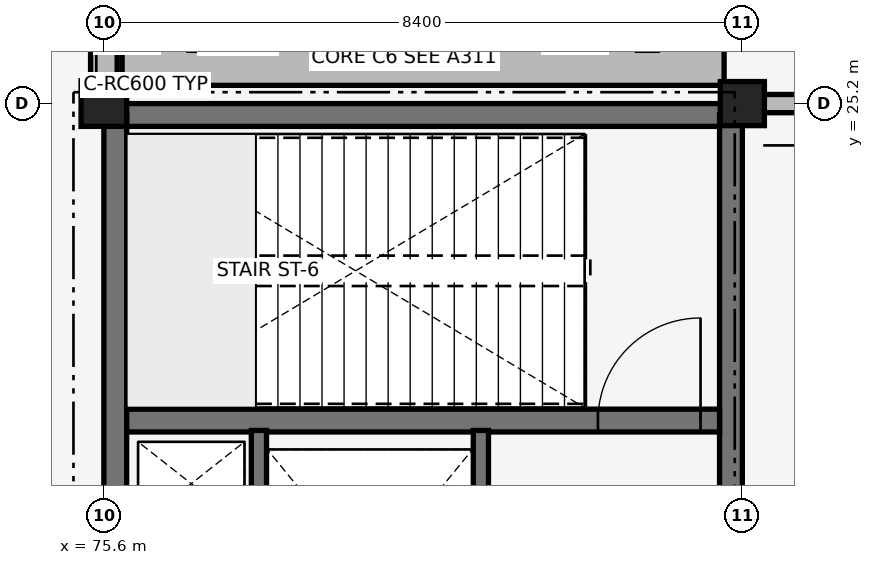
"""IFC4 building model, lengths in metres.
Left out: names, types, materials, properties, quantities, classifications, styles, units other than length and angle.
Written with IfcOpenShell. Run it as: python <this file> out.ifc"""

import sys

from ifc_helpers import new_model, si_unit, direction, frame, frame_2d, origin, origin_2d, place, context, subcontext, project, spatial, polyline, rectangle, outline, extrude, element, fill, save


model = new_model("IFC4")
c1 = context("Model", 3, precision=1e-05, world=origin(), true_north=direction((0.0, 1.0)))
c2 = subcontext(c1, "Body", "Model", "MODEL_VIEW")
j1 = project(units=[si_unit("LENGTHUNIT", "METRE"), si_unit("PLANEANGLEUNIT", "RADIAN")], contexts=[c1])
p1 = place(None, origin())
s1 = spatial("IfcSite", under=j1, at=p1, CompositionType="ELEMENT")
p2 = place(p1, origin())
s2 = spatial("IfcBuilding", under=s1, at=p2, CompositionType="ELEMENT")
p3 = place(p2, origin())
s3 = spatial("IfcBuildingStorey", under=s2, at=p3, CompositionType="ELEMENT", Elevation=0.0)
for number, where, z_axis, x_axis in (
    (1, (75.75, 25.05, 0.0), (0.0, 0.0, 1.0), (1.0, 0.0, 0.0)),
    (2, (75.75, 16.95, 0.0), (0.0, 0.0, 1.0), (0.0, 1.0, 0.0)),
):
    element("IfcWall", number, at=place(p3, frame(where, z_axis=z_axis, x_axis=x_axis)), inside=s3, PredefinedType="SHEAR", context=c2, shape_type="SweptSolid", body=[
        extrude(rectangle(XDim=8.1, YDim=0.3, at=frame_2d((4.05, 0.0))), origin(), (0.0, 0.0, 1.0), 5.14),
    ])
p4 = place(p3, frame((83.85, 16.95, 0.0), z_axis=(0.0, 0.0, 1.0), x_axis=(0.0, 1.0, 0.0)))
e3 = element("IfcWall", 3, at=p4, inside=s3, PredefinedType="SHEAR", context=c2, shape_type="SweptSolid", body=[
    extrude(rectangle(XDim=8.1, YDim=0.3, at=frame_2d((4.05, 0.0))), origin(), (0.0, 0.0, 1.0), 5.14),
])
p5 = place(p4, frame((1.325, 0.0, 0.0)))
e4 = element("IfcOpeningElement", 4, at=p5, cuts=e3, PredefinedType="OPENING", context=c2, shape_type="SweptSolid", body=[
    extrude(rectangle(XDim=1.45, YDim=2.15, at=frame_2d((0.725, 1.075))), frame((0.0, 0.16, 0.0), z_axis=(0.0, -1.0, 0.0), x_axis=(1.0, 0.0, 0.0)), (0.0, 0.0, 1.0), 0.32),
])
p6 = place(p3, frame((75.9, 21.03, 0.0), z_axis=(0.0, 0.0, 1.0), x_axis=(1.0, 0.0, 0.0)))
e5 = element("IfcWall", 5, at=p6, inside=s3, PredefinedType="SHEAR", context=c2, shape_type="SweptSolid", body=[
    extrude(rectangle(XDim=7.8, YDim=0.3, at=frame_2d((3.9, 0.0))), origin(), (0.0, 0.0, 1.0), 5.14),
])
p7 = place(p6, frame((6.2, 0.0, 0.0)))
e6 = element("IfcOpeningElement", 6, at=p7, cuts=e5, PredefinedType="OPENING", context=c2, shape_type="SweptSolid", body=[
    extrude(rectangle(XDim=1.35, YDim=2.15, at=frame_2d((0.675, 1.075))), frame((0.0, 0.16, 0.0), z_axis=(0.0, -1.0, 0.0), x_axis=(1.0, 0.0, 0.0)), (0.0, 0.0, 1.0), 0.32),
])
p8 = place(p3, frame((75.6, 25.2, 0.0), z_axis=(0.0, 0.0, 1.0), x_axis=(1.0, 0.0, 0.0)))
e7 = element("IfcColumn", 7, at=p8, inside=s3, PredefinedType="COLUMN", context=c2, shape_type="SweptSolid", body=[
    extrude(rectangle(XDim=0.6, YDim=0.6, at=origin_2d()), origin(), (0.0, 0.0, 1.0), 5.14),
])
p9 = place(p3, frame((84.0, 25.2, 0.0), z_axis=(0.0, 0.0, 1.0), x_axis=(1.0, 0.0, 0.0)))
e8 = element("IfcColumn", 8, at=p9, inside=s3, PredefinedType="COLUMN", context=c2, shape_type="SweptSolid", body=[
    extrude(rectangle(XDim=0.58, YDim=0.58, at=origin_2d()), origin(), (0.0, 0.0, 1.0), 5.14),
])
p10 = place(p3, frame((75.6, 25.2, 5.145), z_axis=(0.0, 0.0, 1.0), x_axis=(0.0, 1.0, 0.0)))
e9 = element("IfcWall", 9, at=p10, inside=s3, PredefinedType="SOLIDWALL", context=c2, shape_type="SweptSolid", body=[
    extrude(outline(polyline([(0.0, 0.0), (8.4, 0.0), (8.4, 0.25), (4.2, 2.489), (0.0, 0.25), (0.0, 0.0)])), frame((0.0, 0.175, 0.0), z_axis=(0.0, -1.0, 0.0), x_axis=(1.0, 0.0, 0.0)), (0.0, 0.0, 1.0), 0.35),
])
p11 = place(p3, frame((75.84, 25.68, -0.25), z_axis=(0.0, 0.0, 1.0), x_axis=(1.0, 0.0, 0.0)))
e10 = element("IfcWall", 10, at=p11, inside=s3, PredefinedType="SOLIDWALL", context=c2, shape_type="SweptSolid", body=[
    extrude(rectangle(XDim=7.92, YDim=0.48, at=frame_2d((3.96, 0.0))), origin(), (0.0, 0.0, 1.0), 5.69),
])
p12 = place(p3, frame((84.275, 25.2, 0.0), z_axis=(0.0, 0.0, 1.0), x_axis=(1.0, 0.0, 0.0)))
e11 = element("IfcWall", 11, at=p12, inside=s3, PredefinedType="SOLIDWALL", context=c2, shape_type="SweptSolid", body=[
    extrude(rectangle(XDim=7.84, YDim=0.24, at=frame_2d((3.92, 0.0))), origin(), (0.0, 0.0, 1.0), 4.39),
])
p13 = place(p12, frame((0.804, 0.0, 0.35)))
e12 = element("IfcOpeningElement", 12, at=p13, cuts=e11, PredefinedType="OPENING", context=c2, shape_type="SweptSolid", body=[
    extrude(rectangle(XDim=0.44, YDim=1.25, at=frame_2d((0.22, 0.625))), frame((0.0, 0.13, 0.0), z_axis=(0.0, -1.0, 0.0), x_axis=(1.0, 0.0, 0.0)), (0.0, 0.0, 1.0), 0.26),
])
p14 = place(p12, frame((2.252, 0.0, 0.35)))
e13 = element("IfcOpeningElement", 13, at=p14, cuts=e11, PredefinedType="OPENING", context=c2, shape_type="SweptSolid", body=[
    extrude(rectangle(XDim=0.44, YDim=1.25, at=frame_2d((0.22, 0.625))), frame((0.0, 0.13, 0.0), z_axis=(0.0, -1.0, 0.0), x_axis=(1.0, 0.0, 0.0)), (0.0, 0.0, 1.0), 0.26),
])
p15 = place(p12, frame((3.7, 0.0, 0.35)))
e14 = element("IfcOpeningElement", 14, at=p15, cuts=e11, PredefinedType="OPENING", context=c2, shape_type="SweptSolid", body=[
    extrude(rectangle(XDim=0.44, YDim=1.25, at=frame_2d((0.22, 0.625))), frame((0.0, 0.13, 0.0), z_axis=(0.0, -1.0, 0.0), x_axis=(1.0, 0.0, 0.0)), (0.0, 0.0, 1.0), 0.26),
])
p16 = place(p12, frame((5.148, 0.0, 0.35)))
e15 = element("IfcOpeningElement", 15, at=p16, cuts=e11, PredefinedType="OPENING", context=c2, shape_type="SweptSolid", body=[
    extrude(rectangle(XDim=0.44, YDim=1.25, at=frame_2d((0.22, 0.625))), frame((0.0, 0.13, 0.0), z_axis=(0.0, -1.0, 0.0), x_axis=(1.0, 0.0, 0.0)), (0.0, 0.0, 1.0), 0.26),
])
p17 = place(p12, frame((6.596, 0.0, 0.35)))
e16 = element("IfcOpeningElement", 16, at=p17, cuts=e11, PredefinedType="OPENING", context=c2, shape_type="SweptSolid", body=[
    extrude(rectangle(XDim=0.44, YDim=1.25, at=frame_2d((0.22, 0.625))), frame((0.0, 0.13, 0.0), z_axis=(0.0, -1.0, 0.0), x_axis=(1.0, 0.0, 0.0)), (0.0, 0.0, 1.0), 0.26),
])
p18 = place(p12, frame((0.804, 0.0, 1.8)))
e17 = element("IfcOpeningElement", 17, at=p18, cuts=e11, PredefinedType="OPENING", context=c2, shape_type="SweptSolid", body=[
    extrude(rectangle(XDim=0.44, YDim=1.25, at=frame_2d((0.22, 0.625))), frame((0.0, 0.13, 0.0), z_axis=(0.0, -1.0, 0.0), x_axis=(1.0, 0.0, 0.0)), (0.0, 0.0, 1.0), 0.26),
])
p19 = place(p12, frame((2.252, 0.0, 1.8)))
e18 = element("IfcOpeningElement", 18, at=p19, cuts=e11, PredefinedType="OPENING", context=c2, shape_type="SweptSolid", body=[
    extrude(rectangle(XDim=0.44, YDim=1.25, at=frame_2d((0.22, 0.625))), frame((0.0, 0.13, 0.0), z_axis=(0.0, -1.0, 0.0), x_axis=(1.0, 0.0, 0.0)), (0.0, 0.0, 1.0), 0.26),
])
p20 = place(p12, frame((3.7, 0.0, 1.8)))
e19 = element("IfcOpeningElement", 19, at=p20, cuts=e11, PredefinedType="OPENING", context=c2, shape_type="SweptSolid", body=[
    extrude(rectangle(XDim=0.44, YDim=1.25, at=frame_2d((0.22, 0.625))), frame((0.0, 0.13, 0.0), z_axis=(0.0, -1.0, 0.0), x_axis=(1.0, 0.0, 0.0)), (0.0, 0.0, 1.0), 0.26),
])
p21 = place(p12, frame((5.148, 0.0, 1.8)))
e20 = element("IfcOpeningElement", 20, at=p21, cuts=e11, PredefinedType="OPENING", context=c2, shape_type="SweptSolid", body=[
    extrude(rectangle(XDim=0.44, YDim=1.25, at=frame_2d((0.22, 0.625))), frame((0.0, 0.13, 0.0), z_axis=(0.0, -1.0, 0.0), x_axis=(1.0, 0.0, 0.0)), (0.0, 0.0, 1.0), 0.26),
])
p22 = place(p12, frame((6.596, 0.0, 1.8)))
e21 = element("IfcOpeningElement", 21, at=p22, cuts=e11, PredefinedType="OPENING", context=c2, shape_type="SweptSolid", body=[
    extrude(rectangle(XDim=0.44, YDim=1.25, at=frame_2d((0.22, 0.625))), frame((0.0, 0.13, 0.0), z_axis=(0.0, -1.0, 0.0), x_axis=(1.0, 0.0, 0.0)), (0.0, 0.0, 1.0), 0.26),
])
p23 = place(p3, frame((80.56, 17.1, 0.0), z_axis=(0.0, 0.0, 1.0), x_axis=(0.0, 1.0, 0.0)))
e22 = element("IfcWall", 22, at=p23, inside=s3, PredefinedType="SHEAR", context=c2, shape_type="SweptSolid", body=[
    extrude(rectangle(XDim=3.8, YDim=0.2, at=frame_2d((1.9, 0.0))), origin(), (0.0, 0.0, 1.0), 4.36),
])
p24 = place(p23, frame((1.35, 0.0, 0.0)))
e23 = element("IfcOpeningElement", 23, at=p24, cuts=e22, PredefinedType="OPENING", context=c2, shape_type="SweptSolid", body=[
    extrude(rectangle(XDim=1.1, YDim=2.15, at=frame_2d((0.55, 1.075))), frame((0.0, 0.11, 0.0), z_axis=(0.0, -1.0, 0.0), x_axis=(1.0, 0.0, 0.0)), (0.0, 0.0, 1.0), 0.22),
])
p25 = place(p3, frame((77.64, 17.1, 0.0), z_axis=(0.0, 0.0, 1.0), x_axis=(0.0, 1.0, 0.0)))
e24 = element("IfcWall", 24, at=p25, inside=s3, PredefinedType="SHEAR", context=c2, shape_type="SweptSolid", body=[
    extrude(rectangle(XDim=3.8, YDim=0.2, at=frame_2d((1.9, 0.0))), origin(), (0.0, 0.0, 1.0), 4.36),
])
p26 = place(p7, origin())
e25 = element("IfcDoor", 25, at=p26, inside=s3, OperationType="SINGLE_SWING_RIGHT", PredefinedType="DOOR", context=c2, shape_type="SweptSolid", body=[
    extrude(rectangle(XDim=1.35, YDim=2.15, at=frame_2d((0.675, 1.075))), frame((0.0, 0.025, 0.0), z_axis=(0.0, -1.0, 0.0), x_axis=(1.0, 0.0, 0.0)), (0.0, 0.0, 1.0), 0.05),
])
fill(e6, e25)
save(model, sys.argv[1])
